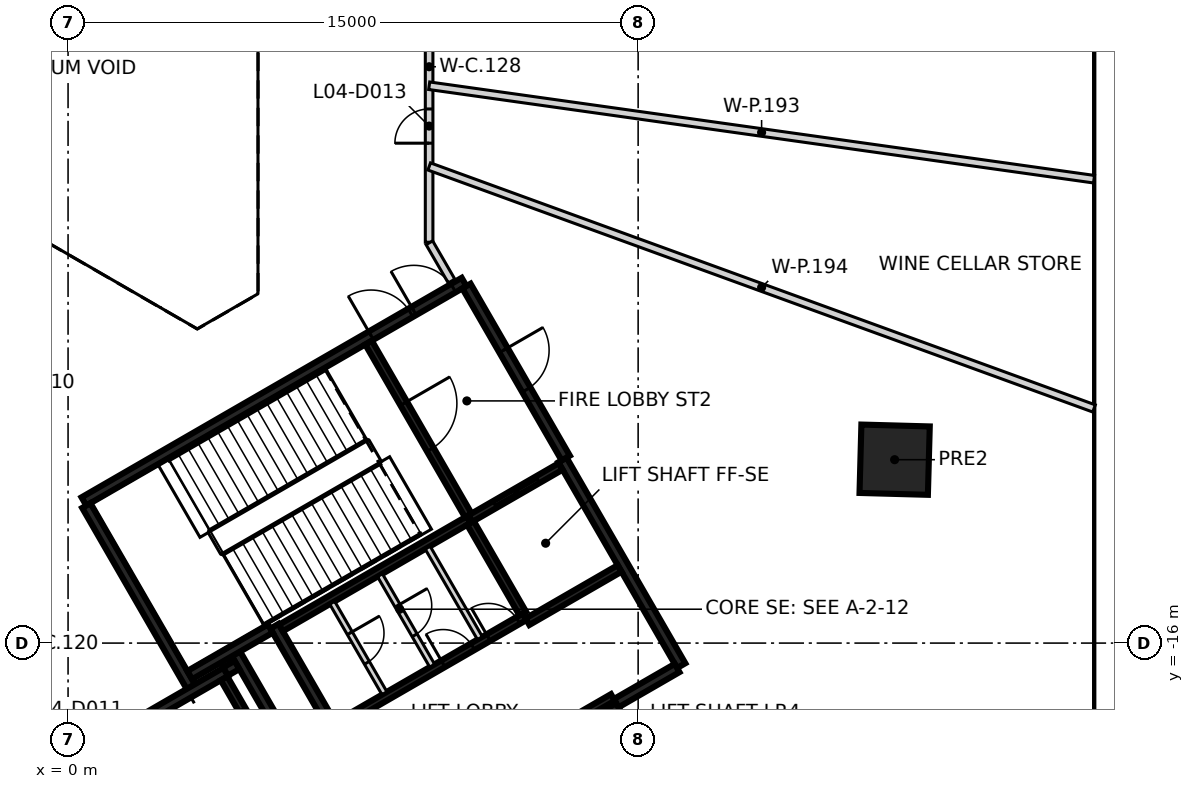
"""IFC4 building model, lengths in metres.
Left out: names, types, materials, properties, quantities, classifications, styles, units other than length and angle.
Written with IfcOpenShell. Run it as: python <this file> out.ifc"""

import sys

from ifc_helpers import new_model, si_unit, direction, frame, frame_2d, origin, origin_2d, place, context, subcontext, project, spatial, rectangle, extrude, element, fill, save


model = new_model("IFC4")
c1 = context("Model", 3, precision=1e-05, world=origin(), true_north=direction((0.0, 1.0)))
c2 = subcontext(c1, "Body", "Model", "MODEL_VIEW")
j1 = project(units=[si_unit("LENGTHUNIT", "METRE"), si_unit("PLANEANGLEUNIT", "RADIAN")], contexts=[c1])
p1 = place(None, origin())
s1 = spatial("IfcSite", under=j1, at=p1, CompositionType="ELEMENT")
p2 = place(p1, origin())
s2 = spatial("IfcBuilding", under=s1, at=p2, CompositionType="ELEMENT")
p3 = place(p2, frame((0.0, 0.0, 24.5)))
s3 = spatial("IfcBuildingStorey", under=s2, at=p3, CompositionType="ELEMENT", Elevation=24.5)
p4 = place(p3, frame((21.749, -11.174, -0.45), z_axis=(0.0, 0.0, 1.0), x_axis=(-0.999628128016, 0.02726913418, 0.0)))
e1 = element("IfcColumn", 1, at=p4, inside=s3, PredefinedType="COLUMN", context=c2, shape_type="SweptSolid", body=[
    extrude(rectangle(XDim=1.8, YDim=1.8, at=origin_2d()), origin(), (0.0, 0.0, 1.0), 5.05),
])
p5 = place(p3, frame((0.417, -12.273, 0.0), z_axis=(0.0, 0.0, 1.0), x_axis=(0.866021906294, 0.500006057782, 0.0)))
e2 = element("IfcWall", 2, at=p5, inside=s3, PredefinedType="SHEAR", context=c2, shape_type="SweptSolid", body=[
    extrude(rectangle(XDim=11.55, YDim=0.25, at=frame_2d((5.775, 0.0))), origin(), (0.0, 0.0, 1.0), 4.6),
])
p6 = place(p5, frame((10.025, 0.0, 0.0)))
e3 = element("IfcOpeningElement", 3, at=p6, cuts=e2, PredefinedType="OPENING", context=c2, shape_type="SweptSolid", body=[
    extrude(rectangle(XDim=1.2, YDim=2.1, at=frame_2d((0.6, 1.05))), frame((0.0, 0.135, 0.0), z_axis=(0.0, -1.0, 0.0), x_axis=(1.0, 0.0, 0.0)), (0.0, 0.0, 1.0), 0.27),
])
p7 = place(p5, frame((8.725, 0.0, 0.0)))
e4 = element("IfcOpeningElement", 4, at=p7, cuts=e2, PredefinedType="OPENING", context=c2, shape_type="SweptSolid", body=[
    extrude(rectangle(XDim=1.2, YDim=2.1, at=frame_2d((0.6, 1.05))), frame((0.0, 0.135, 0.0), z_axis=(0.0, -1.0, 0.0), x_axis=(1.0, 0.0, 0.0)), (0.0, 0.0, 1.0), 0.27),
])
p8 = place(p3, frame((13.008, -11.181, 0.0), z_axis=(0.0, 0.0, 1.0), x_axis=(0.500004234368, -0.866022959057, 0.0)))
e5 = element("IfcWall", 5, at=p8, inside=s3, PredefinedType="SHEAR", context=c2, shape_type="SweptSolid", body=[
    extrude(rectangle(XDim=6.25, YDim=0.25, at=frame_2d((3.125, 0.0))), origin(), (0.0, 0.0, 1.0), 4.6),
])
p9 = place(p3, frame((3.235, -17.153, 0.0), z_axis=(0.0, 0.0, 1.0), x_axis=(-0.500008851346, 0.866020293397, 0.0)))
e6 = element("IfcWall", 6, at=p9, inside=s3, PredefinedType="SHEAR", context=c2, shape_type="SweptSolid", body=[
    extrude(rectangle(XDim=5.51, YDim=0.25, at=frame_2d((2.755, 0.0))), origin(), (0.0, 0.0, 1.0), 4.6),
])
p10 = place(p3, frame((10.483, -6.606, 0.0), z_axis=(0.0, 0.0, 1.0), x_axis=(0.49999885962, -0.866026062182, 0.0)))
e7 = element("IfcWall", 7, at=p10, inside=s3, PredefinedType="SHEAR", context=c2, shape_type="SweptSolid", body=[
    extrude(rectangle(XDim=5.225, YDim=0.25, at=frame_2d((2.612, 0.0))), origin(), (0.0, 0.0, 1.0), 4.6),
])
p11 = place(p10, frame((1.95, 0.0, 0.0)))
e8 = element("IfcOpeningElement", 8, at=p11, cuts=e7, PredefinedType="OPENING", context=c2, shape_type="SweptSolid", body=[
    extrude(rectangle(XDim=1.2, YDim=2.1, at=frame_2d((0.6, 1.05))), frame((0.0, 0.135, 0.0), z_axis=(0.0, -1.0, 0.0), x_axis=(1.0, 0.0, 0.0)), (0.0, 0.0, 1.0), 0.27),
])
p12 = place(p3, frame((7.031, -18.327, 0.0), z_axis=(0.0, 0.0, 1.0), x_axis=(-0.499971222258, 0.866042017984, 0.0)))
e9 = element("IfcWall", 9, at=p12, inside=s3, PredefinedType="SHEAR", context=c2, shape_type="SweptSolid", body=[
    extrude(rectangle(XDim=3.2, YDim=0.25, at=frame_2d((1.6, 0.0))), origin(), (0.0, 0.0, 1.0), 4.6),
])
p13 = place(p3, frame((14.315, -17.644, 0.0), z_axis=(0.0, 0.0, 1.0), x_axis=(0.500023226632, -0.866011993467, 0.0)))
e10 = element("IfcWall", 10, at=p13, inside=s3, PredefinedType="SHEAR", context=c2, shape_type="SweptSolid", body=[
    extrude(rectangle(XDim=2.974, YDim=0.25, at=frame_2d((1.487, 0.0))), origin(), (0.0, 0.0, 1.0), 4.6),
])
p14 = place(p3, frame((1.669, -18.19, 0.0), z_axis=(0.0, 0.0, 1.0), x_axis=(0.866042235819, 0.499970844928, 0.0)))
e11 = element("IfcWall", 11, at=p14, inside=s3, PredefinedType="SHEAR", context=c2, shape_type="SweptSolid", body=[
    extrude(rectangle(XDim=2.865, YDim=0.25, at=frame_2d((1.432, 0.0))), origin(), (0.0, 0.0, 1.0), 4.6),
])
p15 = place(p3, frame((4.414, -16.276, 0.0), z_axis=(0.0, 0.0, 1.0), x_axis=(0.500003324108, -0.866023484601, 0.0)))
e12 = element("IfcWall", 12, at=p15, inside=s3, PredefinedType="SHEAR", context=c2, shape_type="SweptSolid", body=[
    extrude(rectangle(XDim=3.085, YDim=0.25, at=frame_2d((1.542, 0.0))), origin(), (0.0, 0.0, 1.0), 4.6),
])
p16 = place(p3, frame((5.322, -15.619, 0.0), z_axis=(0.0, 0.0, 1.0), x_axis=(-0.866026229868, -0.499998569178, 0.0)))
e13 = element("IfcWall", 13, at=p16, inside=s3, PredefinedType="SHEAR", context=c2, shape_type="SweptSolid", body=[
    extrude(rectangle(XDim=2.449, YDim=0.25, at=frame_2d((1.225, 0.0))), origin(), (0.0, 0.0, 1.0), 4.6),
])
p17 = place(p3, frame((16.025, -16.656, 0.0), z_axis=(0.0, 0.0, 1.0), x_axis=(-0.866016279763, -0.500015802937, 0.0)))
e14 = element("IfcWall", 14, at=p17, inside=s3, PredefinedType="SHEAR", context=c2, shape_type="SweptSolid", body=[
    extrude(rectangle(XDim=1.849, YDim=0.25, at=frame_2d((0.925, 0.0))), origin(), (0.0, 0.0, 1.0), 4.6),
])
p18 = place(p3, frame((4.145, -16.749, 0.0), z_axis=(0.0, 0.0, 1.0), x_axis=(0.866185586049, 0.49972245349, 0.0)))
e15 = element("IfcWall", 15, at=p18, inside=s3, PredefinedType="SHEAR", context=c2, shape_type="SweptSolid", body=[
    extrude(rectangle(XDim=0.344, YDim=0.25, at=frame_2d((0.172, 0.0))), origin(), (0.0, 0.0, 1.0), 4.6),
])
p19 = place(p3, frame((9.052, -20.48, 0.0), z_axis=(0.0, 0.0, 1.0), x_axis=(0.866030299012, 0.499991521122, 0.0)))
e16 = element("IfcWall", 16, at=p19, inside=s3, PredefinedType="SHEAR", context=c2, shape_type="SweptSolid", body=[
    extrude(rectangle(XDim=6.1, YDim=0.2, at=frame_2d((3.05, 0.0))), origin(), (0.0, 0.0, 1.0), 4.6),
])
p20 = place(p19, frame((1.0, 0.0, 0.0)))
e17 = element("IfcOpeningElement", 17, at=p20, cuts=e16, PredefinedType="OPENING", context=c2, shape_type="SweptSolid", body=[
    extrude(rectangle(XDim=1.2, YDim=2.1, at=frame_2d((0.6, 1.05))), frame((0.0, 0.11, 0.0), z_axis=(0.0, -1.0, 0.0), x_axis=(1.0, 0.0, 0.0)), (0.0, 0.0, 1.0), 0.22),
])
p21 = place(p19, frame((4.05, 0.0, 0.0)))
e18 = element("IfcOpeningElement", 18, at=p21, cuts=e16, PredefinedType="OPENING", context=c2, shape_type="SweptSolid", body=[
    extrude(rectangle(XDim=1.2, YDim=2.1, at=frame_2d((0.6, 1.05))), frame((0.0, 0.11, 0.0), z_axis=(0.0, -1.0, 0.0), x_axis=(1.0, 0.0, 0.0)), (0.0, 0.0, 1.0), 0.22),
])
p22 = place(p3, frame((10.538, -12.752, 0.0), z_axis=(0.0, 0.0, 1.0), x_axis=(-0.866038630372, -0.499977090179, 0.0)))
e19 = element("IfcWall", 19, at=p22, inside=s3, PredefinedType="SHEAR", context=c2, shape_type="SweptSolid", body=[
    extrude(rectangle(XDim=5.699, YDim=0.2, at=frame_2d((2.85, 0.0))), origin(), (0.0, 0.0, 1.0), 4.6),
])
p23 = place(p3, frame((7.077, -18.156, 0.0), z_axis=(0.0, 0.0, 1.0), x_axis=(0.866038630372, 0.499977090179, 0.0)))
e20 = element("IfcWall", 20, at=p23, inside=s3, PredefinedType="SHEAR", context=c2, shape_type="SweptSolid", body=[
    extrude(rectangle(XDim=5.699, YDim=0.2, at=frame_2d((2.85, 0.0))), origin(), (0.0, 0.0, 1.0), 4.6),
])
p24 = place(p23, frame((3.224, 0.0, 0.0)))
e21 = element("IfcOpeningElement", 21, at=p24, cuts=e20, PredefinedType="OPENING", context=c2, shape_type="SweptSolid", body=[
    extrude(rectangle(XDim=0.9, YDim=2.1, at=frame_2d((0.45, 1.05))), frame((0.0, 0.11, 0.0), z_axis=(0.0, -1.0, 0.0), x_axis=(1.0, 0.0, 0.0)), (0.0, 0.0, 1.0), 0.22),
])
p25 = place(p23, frame((4.599, 0.0, 0.0)))
e22 = element("IfcOpeningElement", 22, at=p25, cuts=e20, PredefinedType="OPENING", context=c2, shape_type="SweptSolid", body=[
    extrude(rectangle(XDim=0.9, YDim=2.1, at=frame_2d((0.45, 1.05))), frame((0.0, 0.11, 0.0), z_axis=(0.0, -1.0, 0.0), x_axis=(1.0, 0.0, 0.0)), (0.0, 0.0, 1.0), 0.22),
])
p26 = place(p3, frame((7.906, -8.094, 0.0), z_axis=(0.0, 0.0, 1.0), x_axis=(0.500024287448, -0.866011380966, 0.0)))
e23 = element("IfcWall", 23, at=p26, inside=s3, PredefinedType="SHEAR", context=c2, shape_type="SweptSolid", body=[
    extrude(rectangle(XDim=5.251, YDim=0.2, at=frame_2d((2.625, 0.0))), origin(), (0.0, 0.0, 1.0), 4.6),
])
p27 = place(p26, frame((1.849, 0.0, 0.0)))
e24 = element("IfcOpeningElement", 24, at=p27, cuts=e23, PredefinedType="OPENING", context=c2, shape_type="SweptSolid", body=[
    extrude(rectangle(XDim=1.4, YDim=2.1, at=frame_2d((0.7, 1.05))), frame((0.0, 0.11, 0.0), z_axis=(0.0, -1.0, 0.0), x_axis=(1.0, 0.0, 0.0)), (0.0, 0.0, 1.0), 0.22),
])
p28 = place(p3, frame((5.503, -19.352, 0.0), z_axis=(0.0, 0.0, 1.0), x_axis=(-0.499986818241, 0.866033014143, 0.0)))
e25 = element("IfcWall", 25, at=p28, inside=s3, PredefinedType="SHEAR", context=c2, shape_type="SweptSolid", body=[
    extrude(rectangle(XDim=2.798, YDim=0.2, at=frame_2d((1.399, 0.0))), origin(), (0.0, 0.0, 1.0), 4.6),
])
p29 = place(p28, frame((0.949, 0.0, 0.0)))
e26 = element("IfcOpeningElement", 26, at=p29, cuts=e25, PredefinedType="OPENING", context=c2, shape_type="SweptSolid", body=[
    extrude(rectangle(XDim=0.9, YDim=2.1, at=frame_2d((0.45, 1.05))), frame((0.0, 0.11, 0.0), z_axis=(0.0, -1.0, 0.0), x_axis=(1.0, 0.0, 0.0)), (0.0, 0.0, 1.0), 0.22),
])
p30 = place(p3, frame((11.963, -15.22, 0.0), z_axis=(0.0, 0.0, 1.0), x_axis=(-0.500034990121, 0.866005201286, 0.0)))
e27 = element("IfcWall", 27, at=p30, inside=s3, PredefinedType="SHEAR", context=c2, shape_type="SweptSolid", body=[
    extrude(rectangle(XDim=2.75, YDim=0.2, at=frame_2d((1.375, 0.0))), origin(), (0.0, 0.0, 1.0), 4.6),
])
p31 = place(p3, frame((10.587, -12.723, 0.0), z_axis=(0.0, 0.0, 1.0), x_axis=(0.866037306777, 0.499979382845, 0.0)))
e28 = element("IfcWall", 28, at=p31, inside=s3, PredefinedType="SHEAR", context=c2, shape_type="SweptSolid", body=[
    extrude(rectangle(XDim=2.742, YDim=0.2, at=frame_2d((1.371, 0.0))), origin(), (0.0, 0.0, 1.0), 4.6),
])
p32 = place(p31, frame((0.743, 0.0, 0.0)))
e29 = element("IfcOpeningElement", 29, at=p32, cuts=e28, PredefinedType="OPENING", context=c2, shape_type="SweptSolid", body=[
    extrude(rectangle(XDim=1.3, YDim=2.1, at=frame_2d((0.65, 1.05))), frame((0.0, 0.11, 0.0), z_axis=(0.0, -1.0, 0.0), x_axis=(1.0, 0.0, 0.0)), (0.0, 0.0, 1.0), 0.22),
])
p33 = place(p3, frame((14.512, -14.037, 0.0), z_axis=(0.0, 0.0, 1.0), x_axis=(-0.866044696403, -0.499966582715, 0.0)))
e30 = element("IfcWall", 30, at=p33, inside=s3, PredefinedType="SHEAR", context=c2, shape_type="SweptSolid", body=[
    extrude(rectangle(XDim=2.799, YDim=0.2, at=frame_2d((1.399, 0.0))), origin(), (0.0, 0.0, 1.0), 4.6),
])
p34 = place(p3, frame((8.207, -14.214, 0.0), z_axis=(0.0, 0.0, 1.0), x_axis=(0.50002746344, -0.86600954718, 0.0)))
e31 = element("IfcWall", 31, at=p34, inside=s3, PredefinedType="PARTITIONING", context=c2, shape_type="SweptSolid", body=[
    extrude(rectangle(XDim=2.748, YDim=0.15, at=frame_2d((1.374, 0.0))), origin(), (0.0, 0.0, 1.0), 4.6),
])
p35 = place(p34, frame((0.924, 0.0, 0.0)))
e32 = element("IfcOpeningElement", 32, at=p35, cuts=e31, PredefinedType="OPENING", context=c2, shape_type="SweptSolid", body=[
    extrude(rectangle(XDim=0.9, YDim=2.1, at=frame_2d((0.45, 1.05))), frame((0.0, 0.085, 0.0), z_axis=(0.0, -1.0, 0.0), x_axis=(1.0, 0.0, 0.0)), (0.0, 0.0, 1.0), 0.17),
])
p36 = place(p3, frame((9.462, -13.489, 0.0), z_axis=(0.0, 0.0, 1.0), x_axis=(0.499988999718, -0.866031754707, 0.0)))
e33 = element("IfcWall", 33, at=p36, inside=s3, PredefinedType="PARTITIONING", context=c2, shape_type="SweptSolid", body=[
    extrude(rectangle(XDim=2.749, YDim=0.15, at=frame_2d((1.374, 0.0))), origin(), (0.0, 0.0, 1.0), 4.6),
])
p37 = place(p3, frame((6.951, -14.939, 0.0), z_axis=(0.0, 0.0, 1.0), x_axis=(0.499988999718, -0.866031754707, 0.0)))
e34 = element("IfcWall", 34, at=p37, inside=s3, PredefinedType="PARTITIONING", context=c2, shape_type="SweptSolid", body=[
    extrude(rectangle(XDim=2.749, YDim=0.15, at=frame_2d((1.374, 0.0))), origin(), (0.0, 0.0, 1.0), 4.6),
])
p38 = place(p37, frame((0.924, 0.0, 0.0)))
e35 = element("IfcOpeningElement", 35, at=p38, cuts=e34, PredefinedType="OPENING", context=c2, shape_type="SweptSolid", body=[
    extrude(rectangle(XDim=0.9, YDim=2.1, at=frame_2d((0.45, 1.05))), frame((0.0, 0.085, 0.0), z_axis=(0.0, -1.0, 0.0), x_axis=(1.0, 0.0, 0.0)), (0.0, 0.0, 1.0), 0.17),
])
p39 = place(p3, frame((9.5, -5.453, 0.0), z_axis=(0.0, 0.0, 1.0), x_axis=(0.0, 1.0, 0.0)))
e36 = element("IfcWall", 36, at=p39, inside=s3, PredefinedType="PARTITIONING", context=c2, shape_type="SweptSolid", body=[
    extrude(rectangle(XDim=9.236, YDim=0.2, at=frame_2d((4.618, 0.0))), origin(), (0.0, 0.0, 1.0), 4.6),
])
p40 = place(p39, frame((2.606, 0.0, 0.0)))
e37 = element("IfcOpeningElement", 37, at=p40, cuts=e36, PredefinedType="OPENING", context=c2, shape_type="SweptSolid", body=[
    extrude(rectangle(XDim=0.9, YDim=2.1, at=frame_2d((0.45, 1.05))), frame((0.0, 0.11, 0.0), z_axis=(0.0, -1.0, 0.0), x_axis=(1.0, 0.0, 0.0)), (0.0, 0.0, 1.0), 0.22),
])
p41 = place(p3, frame((9.507, -5.467, 0.0), z_axis=(0.0, 0.0, 1.0), x_axis=(0.501234666208, -0.865311394465, 0.0)))
e38 = element("IfcWall", 38, at=p41, inside=s3, PredefinedType="PARTITIONING", context=c2, shape_type="SweptSolid", body=[
    extrude(rectangle(XDim=1.164, YDim=0.2, at=frame_2d((0.582, 0.0))), origin(), (0.0, 0.0, 1.0), 4.6),
])
p42 = place(p3, frame((9.502, -1.335, 0.0), z_axis=(0.0, 0.0, 1.0), x_axis=(0.990260509173, -0.139226879493, 0.0)))
e39 = element("IfcWall", 39, at=p42, inside=s3, PredefinedType="PARTITIONING", context=c2, shape_type="SweptSolid", body=[
    extrude(rectangle(XDim=17.665, YDim=0.2, at=frame_2d((8.833, 0.0))), origin(), (0.0, 0.0, 1.0), 4.6),
])
p43 = place(p3, frame((9.503, -3.459, 0.0), z_axis=(0.0, 0.0, 1.0), x_axis=(0.939690375329, -0.342026312606, 0.0)))
e40 = element("IfcWall", 40, at=p43, inside=s3, PredefinedType="PARTITIONING", context=c2, shape_type="SweptSolid", body=[
    extrude(rectangle(XDim=18.615, YDim=0.2, at=frame_2d((9.308, 0.0))), origin(), (0.0, 0.0, 1.0), 4.6),
])
p44 = place(p32, origin())
e41 = element("IfcDoor", 41, at=p44, inside=s3, OperationType="SLIDING_TO_RIGHT", PredefinedType="DOOR", context=c2, shape_type="SweptSolid", body=[
    extrude(rectangle(XDim=1.3, YDim=2.1, at=frame_2d((0.65, 1.05))), frame((0.0, 0.025, 0.0), z_axis=(0.0, -1.0, 0.0), x_axis=(1.0, 0.0, 0.0)), (0.0, 0.0, 1.0), 0.05),
])
fill(e29, e41)
p45 = place(p6, origin())
e42 = element("IfcDoor", 42, at=p45, inside=s3, OperationType="SINGLE_SWING_LEFT", PredefinedType="DOOR", context=c2, shape_type="SweptSolid", body=[
    extrude(rectangle(XDim=1.2, YDim=2.1, at=frame_2d((0.6, 1.05))), frame((0.0, 0.025, 0.0), z_axis=(0.0, -1.0, 0.0), x_axis=(1.0, 0.0, 0.0)), (0.0, 0.0, 1.0), 0.05),
])
fill(e3, e42)
p46 = place(p7, origin())
e43 = element("IfcDoor", 43, at=p46, inside=s3, OperationType="SINGLE_SWING_RIGHT", PredefinedType="DOOR", context=c2, shape_type="SweptSolid", body=[
    extrude(rectangle(XDim=1.2, YDim=2.1, at=frame_2d((0.6, 1.05))), frame((0.0, 0.025, 0.0), z_axis=(0.0, -1.0, 0.0), x_axis=(1.0, 0.0, 0.0)), (0.0, 0.0, 1.0), 0.05),
])
fill(e4, e43)
p47 = place(p27, origin())
e44 = element("IfcDoor", 44, at=p47, inside=s3, OperationType="SINGLE_SWING_RIGHT", PredefinedType="DOOR", context=c2, shape_type="SweptSolid", body=[
    extrude(rectangle(XDim=1.4, YDim=2.1, at=frame_2d((0.7, 1.05))), frame((0.0, 0.025, 0.0), z_axis=(0.0, -1.0, 0.0), x_axis=(1.0, 0.0, 0.0)), (0.0, 0.0, 1.0), 0.05),
])
fill(e24, e44)
p48 = place(p24, origin())
e45 = element("IfcDoor", 45, at=p48, inside=s3, OperationType="SINGLE_SWING_LEFT", PredefinedType="DOOR", context=c2, shape_type="SweptSolid", body=[
    extrude(rectangle(XDim=0.9, YDim=2.1, at=frame_2d((0.45, 1.05))), frame((0.0, 0.025, 0.0), z_axis=(0.0, -1.0, 0.0), x_axis=(1.0, 0.0, 0.0)), (0.0, 0.0, 1.0), 0.05),
])
fill(e21, e45)
p49 = place(p25, origin())
e46 = element("IfcDoor", 46, at=p49, inside=s3, OperationType="SINGLE_SWING_RIGHT", PredefinedType="DOOR", context=c2, shape_type="SweptSolid", body=[
    extrude(rectangle(XDim=0.9, YDim=2.1, at=frame_2d((0.45, 1.05))), frame((0.0, 0.025, 0.0), z_axis=(0.0, -1.0, 0.0), x_axis=(1.0, 0.0, 0.0)), (0.0, 0.0, 1.0), 0.05),
])
fill(e22, e46)
p50 = place(p35, origin())
e47 = element("IfcDoor", 47, at=p50, inside=s3, OperationType="SINGLE_SWING_RIGHT", PredefinedType="DOOR", context=c2, shape_type="SweptSolid", body=[
    extrude(rectangle(XDim=0.9, YDim=2.1, at=frame_2d((0.45, 1.05))), frame((0.0, 0.025, 0.0), z_axis=(0.0, -1.0, 0.0), x_axis=(1.0, 0.0, 0.0)), (0.0, 0.0, 1.0), 0.05),
])
fill(e32, e47)
p51 = place(p38, origin())
e48 = element("IfcDoor", 48, at=p51, inside=s3, OperationType="SINGLE_SWING_LEFT", PredefinedType="DOOR", context=c2, shape_type="SweptSolid", body=[
    extrude(rectangle(XDim=0.9, YDim=2.1, at=frame_2d((0.45, 1.05))), frame((0.0, 0.025, 0.0), z_axis=(0.0, -1.0, 0.0), x_axis=(1.0, 0.0, 0.0)), (0.0, 0.0, 1.0), 0.05),
])
fill(e35, e48)
p52 = place(p11, origin())
e49 = element("IfcDoor", 49, at=p52, inside=s3, OperationType="SINGLE_SWING_LEFT", PredefinedType="DOOR", context=c2, shape_type="SweptSolid", body=[
    extrude(rectangle(XDim=1.2, YDim=2.1, at=frame_2d((0.6, 1.05))), frame((0.0, 0.025, 0.0), z_axis=(0.0, -1.0, 0.0), x_axis=(1.0, 0.0, 0.0)), (0.0, 0.0, 1.0), 0.05),
])
fill(e8, e49)
p53 = place(p40, frame((0.9, 0.0, 0.0), z_axis=(0.0, 0.0, 1.0), x_axis=(-1.0, 0.0, 0.0)))
e50 = element("IfcDoor", 50, at=p53, inside=s3, OperationType="SINGLE_SWING_LEFT", PredefinedType="DOOR", context=c2, shape_type="SweptSolid", body=[
    extrude(rectangle(XDim=0.9, YDim=2.1, at=frame_2d((0.45, 1.05))), frame((0.0, 0.025, 0.0), z_axis=(0.0, -1.0, 0.0), x_axis=(1.0, 0.0, 0.0)), (0.0, 0.0, 1.0), 0.05),
])
fill(e37, e50)
save(model, sys.argv[1])
